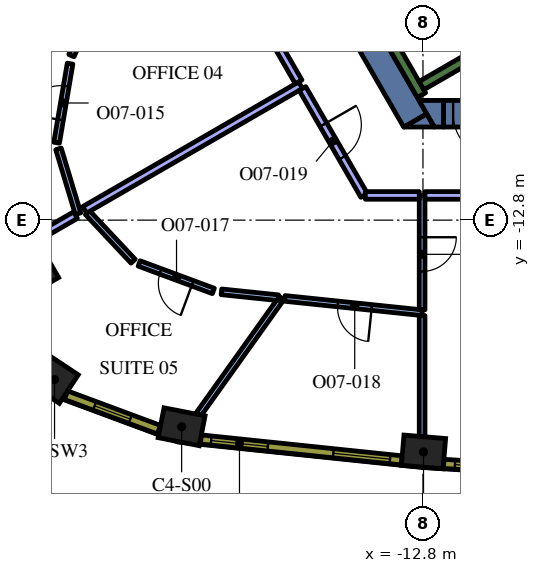
"""IFC4 building model, lengths in metres.
Left out: names, types, materials, properties, quantities, classifications, styles, units other than length and angle.
Written with IfcOpenShell. Run it as: python <this file> out.ifc"""

import sys

from ifc_helpers import new_model, si_unit, direction, frame, frame_2d, origin, origin_2d, place, context, subcontext, project, spatial, polyline, rectangle, outline, extrude, element, fill, save


model = new_model("IFC4")
c1 = context("Model", 3, precision=1e-05, world=origin(), true_north=direction((0.0, 1.0)))
c2 = subcontext(c1, "Body", "Model", "MODEL_VIEW")
j1 = project(units=[si_unit("LENGTHUNIT", "METRE"), si_unit("PLANEANGLEUNIT", "RADIAN")], contexts=[c1])
p1 = place(None, origin())
s1 = spatial("IfcSite", under=j1, at=p1, CompositionType="ELEMENT")
p2 = place(p1, origin())
s2 = spatial("IfcBuilding", under=s1, at=p2, CompositionType="ELEMENT")
p3 = place(p2, frame((0.0, 0.0, 214.2)))
s3 = spatial("IfcBuildingStorey", under=s2, at=p3, CompositionType="ELEMENT", Elevation=214.2)
p4 = place(p3, frame((-24.027, -13.872, 0.0), z_axis=(0.0, 0.0, 1.0), x_axis=(-0.866025403784, -0.5, 0.0)))
e1 = element("IfcColumn", 1, at=p4, inside=s3, PredefinedType="COLUMN", context=c2, shape_type="SweptSolid", body=[
    extrude(rectangle(XDim=2.4, YDim=2.4, at=origin_2d()), origin(), (0.0, 0.0, 1.0), 4.2),
])
for number, where, z_axis, x_axis in (
    (2, (-19.15, -18.237, 0.0), (0.0, 0.0, 1.0), (0.981, -0.192, 0.0)),
    (3, (-12.785, -18.9, 0.0), (0.0, 0.0, 1.0), (0.997, -0.083, 0.0)),
):
    element("IfcColumn", number, at=place(p3, frame(where, z_axis=z_axis, x_axis=x_axis)), inside=s3, PredefinedType="COLUMN", context=c2, shape_type="SweptSolid", body=[
        extrude(rectangle(XDim=1.1, YDim=0.8, at=origin_2d()), origin(), (0.0, 0.0, 1.0), 4.2),
    ])
p5 = place(p3, frame((-22.494, -16.997, 0.0), z_axis=(0.0, 0.0, 1.0), x_axis=(0.833238868178, -0.552913183563, 0.0)))
e4 = element("IfcColumn", 4, at=p5, inside=s3, PredefinedType="COLUMN", context=c2, shape_type="SweptSolid", body=[
    extrude(rectangle(XDim=0.9, YDim=0.9, at=origin_2d()), origin(), (0.0, 0.0, 1.0), 4.2),
])
p6 = place(p3, frame((-14.917, -6.863, 0.0), z_axis=(0.0, 0.0, 1.0), x_axis=(0.499972675833, -0.866041178825, 0.0)))
e5 = element("IfcWall", 5, at=p6, inside=s3, PredefinedType="SOLIDWALL", context=c2, shape_type="SweptSolid", body=[
    extrude(rectangle(XDim=3.829, YDim=0.7, at=frame_2d((1.915, 0.0))), origin(), (0.0, 0.0, 1.0), 4.2),
])
p7 = place(p3, origin())
e6 = element("IfcWall", 6, at=p7, inside=s3, PredefinedType="SOLIDWALL", context=c2, shape_type="SweptSolid", body=[
    extrude(outline(polyline([(-12.5, -10.35), (-13.296, -10.35), (-12.698, -10.005), (-12.5, -10.35)])), origin(), (0.0, 0.0, 1.0), 4.2),
])
e7 = element("IfcWall", 7, at=p7, inside=s3, PredefinedType="SOLIDWALL", context=c2, shape_type="SweptSolid", body=[
    extrude(outline(polyline([(-12.257, -10.35), (-12.5, -10.35), (-12.904, -9.65), (-12.257, -9.65), (-12.257, -10.35)])), origin(), (0.0, 0.0, 1.0), 4.2),
])
p8 = place(p3, frame((-12.84, -9.511, 0.0), z_axis=(0.0, 0.0, 1.0), x_axis=(-0.500048121057, 0.865997619297, 0.0)))
e8 = element("IfcWall", 8, at=p8, inside=s3, PredefinedType="SOLIDWALL", context=c2, shape_type="SweptSolid", body=[
    extrude(rectangle(XDim=3.634, YDim=0.25, at=frame_2d((1.817, 0.0))), origin(), (0.0, 0.0, 1.0), 4.2),
])
p9 = place(p3, frame((-12.84, -9.261, 0.0), z_axis=(0.0, 0.0, 1.0), x_axis=(0.866016039709, 0.500016218704, 0.0)))
e9 = element("IfcWall", 9, at=p9, inside=s3, PredefinedType="SOLIDWALL", context=c2, shape_type="SweptSolid", body=[
    extrude(rectangle(XDim=7.05, YDim=0.25, at=frame_2d((3.525, 0.0))), origin(), (0.0, 0.0, 1.0), 4.2),
])
p10 = place(p3, frame((-10.556, -10.0, 0.0), z_axis=(0.0, 0.0, 1.0), x_axis=(-1.0, 0.0, 0.0)))
e10 = element("IfcWall", 10, at=p10, inside=s3, PredefinedType="SOLIDWALL", context=c2, shape_type="SweptSolid", body=[
    extrude(rectangle(XDim=1.7, YDim=0.7, at=frame_2d((0.85, 0.0))), origin(), (0.0, 0.0, 1.0), 4.2),
])
p11 = place(p10, frame((0.25, 0.0, 0.0)))
e11 = element("IfcOpeningElement", 11, at=p11, cuts=e10, PredefinedType="OPENING", context=c2, shape_type="SweptSolid", body=[
    extrude(rectangle(XDim=1.2, YDim=2.1, at=frame_2d((0.6, 1.05))), frame((0.0, 0.36, 0.0), z_axis=(0.0, -1.0, 0.0), x_axis=(1.0, 0.0, 0.0)), (0.0, 0.0, 1.0), 0.72),
])
p12 = place(p3, frame((-21.386, -6.983, 0.0), z_axis=(0.0, 0.0, 1.0), x_axis=(-0.407597309494, -0.91316177827, 0.0)))
e12 = element("IfcWall", 12, at=p12, inside=s3, PredefinedType="PARTITIONING", context=c2, shape_type="SweptSolid", body=[
    extrude(rectangle(XDim=1.63, YDim=0.15, at=frame_2d((0.815, 0.0))), origin(), (0.0, 0.0, 1.0), 3.45),
])
p13 = place(p3, frame((-22.44, -10.763, 0.0), z_axis=(0.0, 0.0, 1.0), x_axis=(0.167682096872, 0.985841120257, 0.0)))
e13 = element("IfcWall", 13, at=p13, inside=s3, PredefinedType="PARTITIONING", context=c2, shape_type="SweptSolid", body=[
    extrude(rectangle(XDim=2.11, YDim=0.15, at=frame_2d((1.055, 0.0))), origin(), (0.0, 0.0, 1.0), 3.45),
])
p14 = place(p13, frame((0.61, 0.0, 0.0)))
e14 = element("IfcOpeningElement", 14, at=p14, cuts=e13, PredefinedType="OPENING", context=c2, shape_type="SweptSolid", body=[
    extrude(rectangle(XDim=0.9, YDim=2.1, at=frame_2d((0.45, 1.05))), frame((0.0, 0.085, 0.0), z_axis=(0.0, -1.0, 0.0), x_axis=(1.0, 0.0, 0.0)), (0.0, 0.0, 1.0), 0.17),
])
p15 = place(p3, frame((-22.391, -10.924, 0.0), z_axis=(0.0, 0.0, 1.0), x_axis=(0.288642134652, -0.957437056993, 0.0)))
e15 = element("IfcWall", 15, at=p15, inside=s3, PredefinedType="PARTITIONING", context=c2, shape_type="SweptSolid", body=[
    extrude(rectangle(XDim=1.782, YDim=0.15, at=frame_2d((0.891, 0.0))), origin(), (0.0, 0.0, 1.0), 3.45),
])
p16 = place(p3, frame((-21.943, -12.669, 0.0), z_axis=(0.0, 0.0, 1.0), x_axis=(-0.866030586491, -0.499991023182, 0.0)))
e16 = element("IfcWall", 16, at=p16, inside=s3, PredefinedType="PARTITIONING", context=c2, shape_type="SweptSolid", body=[
    extrude(rectangle(XDim=1.207, YDim=0.2, at=frame_2d((0.603, 0.0))), origin(), (0.0, 0.0, 1.0), 3.45),
])
p17 = place(p3, frame((-16.021, -9.25, 0.0), z_axis=(0.0, 0.0, 1.0), x_axis=(-0.866021955858, -0.500005971936, 0.0)))
e17 = element("IfcWall", 17, at=p17, inside=s3, PredefinedType="PARTITIONING", context=c2, shape_type="SweptSolid", body=[
    extrude(rectangle(XDim=6.56, YDim=0.2, at=frame_2d((3.28, 0.0))), origin(), (0.0, 0.0, 1.0), 3.45),
])
p18 = place(p3, frame((-17.681, -6.376, 0.0), z_axis=(0.0, 0.0, 1.0), x_axis=(0.500022299258, -0.866012528919, 0.0)))
e18 = element("IfcWall", 18, at=p18, inside=s3, PredefinedType="PARTITIONING", context=c2, shape_type="SweptSolid", body=[
    extrude(rectangle(XDim=3.219, YDim=0.2, at=frame_2d((1.609, 0.0))), origin(), (0.0, 0.0, 1.0), 3.45),
])
p19 = place(p3, frame((-16.521, -14.851, 0.0), z_axis=(0.0, 0.0, 1.0), x_axis=(-0.58104805465, -0.813869251285, 0.0)))
e19 = element("IfcWall", 19, at=p19, inside=s3, PredefinedType="PARTITIONING", context=c2, shape_type="SweptSolid", body=[
    extrude(rectangle(XDim=3.766, YDim=0.15, at=frame_2d((1.883, 0.0))), origin(), (0.0, 0.0, 1.0), 3.45),
])
p20 = place(p3, frame((-21.628, -12.603, 0.0), z_axis=(0.0, 0.0, 1.0), x_axis=(0.684778496912, -0.728751267695, 0.0)))
e20 = element("IfcWall", 20, at=p20, inside=s3, PredefinedType="PARTITIONING", context=c2, shape_type="SweptSolid", body=[
    extrude(rectangle(XDim=1.754, YDim=0.15, at=frame_2d((0.877, 0.0))), origin(), (0.0, 0.0, 1.0), 3.45),
])
p21 = place(p3, frame((-18.316, -14.664, 0.0), z_axis=(0.0, 0.0, 1.0), x_axis=(-0.937594570401, 0.347730386297, 0.0)))
e21 = element("IfcWall", 21, at=p21, inside=s3, PredefinedType="PARTITIONING", context=c2, shape_type="SweptSolid", body=[
    extrude(rectangle(XDim=2.083, YDim=0.15, at=frame_2d((1.042, 0.0))), origin(), (0.0, 0.0, 1.0), 3.45),
])
p22 = place(p21, frame((0.583, 0.0, 0.0)))
e22 = element("IfcOpeningElement", 22, at=p22, cuts=e21, PredefinedType="OPENING", context=c2, shape_type="SweptSolid", body=[
    extrude(rectangle(XDim=0.9, YDim=2.1, at=frame_2d((0.45, 1.05))), frame((0.0, 0.085, 0.0), z_axis=(0.0, -1.0, 0.0), x_axis=(1.0, 0.0, 0.0)), (0.0, 0.0, 1.0), 0.17),
])
p23 = place(p3, frame((-18.103, -14.686, 0.0), z_axis=(0.0, 0.0, 1.0), x_axis=(0.994622241781, -0.103569281909, 0.0)))
e23 = element("IfcWall", 23, at=p23, inside=s3, PredefinedType="PARTITIONING", context=c2, shape_type="SweptSolid", body=[
    extrude(rectangle(XDim=1.504, YDim=0.15, at=frame_2d((0.752, 0.0))), origin(), (0.0, 0.0, 1.0), 3.45),
])
p24 = place(p3, frame((-12.823, -15.236, 0.0), z_axis=(0.0, 0.0, 1.0), x_axis=(-0.994621582944, 0.10357560882, 0.0)))
e24 = element("IfcWall", 24, at=p24, inside=s3, PredefinedType="PARTITIONING", context=c2, shape_type="SweptSolid", body=[
    extrude(rectangle(XDim=3.632, YDim=0.15, at=frame_2d((1.816, 0.0))), origin(), (0.0, 0.0, 1.0), 3.45),
])
p25 = place(p24, frame((1.332, 0.0, 0.0)))
e25 = element("IfcOpeningElement", 25, at=p25, cuts=e24, PredefinedType="OPENING", context=c2, shape_type="SweptSolid", body=[
    extrude(rectangle(XDim=0.9, YDim=2.1, at=frame_2d((0.45, 1.05))), frame((0.0, 0.085, 0.0), z_axis=(0.0, -1.0, 0.0), x_axis=(1.0, 0.0, 0.0)), (0.0, 0.0, 1.0), 0.17),
])
p26 = place(p3, frame((-12.823, -15.312, 0.0), z_axis=(0.0, 0.0, 1.0), x_axis=(0.0, -1.0, 0.0)))
e26 = element("IfcWall", 26, at=p26, inside=s3, PredefinedType="PARTITIONING", context=c2, shape_type="SweptSolid", body=[
    extrude(rectangle(XDim=3.184, YDim=0.15, at=frame_2d((1.592, 0.0))), origin(), (0.0, 0.0, 1.0), 3.45),
])
p27 = place(p3, frame((-12.823, -12.15, 0.0), z_axis=(0.0, 0.0, 1.0), x_axis=(0.0, -1.0, 0.0)))
e27 = element("IfcWall", 27, at=p27, inside=s3, PredefinedType="PARTITIONING", context=c2, shape_type="SweptSolid", body=[
    extrude(rectangle(XDim=3.011, YDim=0.15, at=frame_2d((1.505, 0.0))), origin(), (0.0, 0.0, 1.0), 3.45),
])
p28 = place(p27, frame((1.1, 0.0, 0.0)))
e28 = element("IfcOpeningElement", 28, at=p28, cuts=e27, PredefinedType="OPENING", context=c2, shape_type="SweptSolid", body=[
    extrude(rectangle(XDim=0.9, YDim=2.1, at=frame_2d((0.45, 1.05))), frame((0.0, 0.085, 0.0), z_axis=(0.0, -1.0, 0.0), x_axis=(1.0, 0.0, 0.0)), (0.0, 0.0, 1.0), 0.17),
])
p29 = place(p3, frame((-15.971, -9.337, 0.0), z_axis=(0.0, 0.0, 1.0), x_axis=(0.500010870188, -0.866019127788, 0.0)))
e29 = element("IfcWall", 29, at=p29, inside=s3, PredefinedType="PARTITIONING", context=c2, shape_type="SweptSolid", body=[
    extrude(rectangle(XDim=3.249, YDim=0.2, at=frame_2d((1.624, 0.0))), origin(), (0.0, 0.0, 1.0), 3.45),
])
p30 = place(p29, frame((1.1, 0.0, 0.0)))
e30 = element("IfcOpeningElement", 30, at=p30, cuts=e29, PredefinedType="OPENING", context=c2, shape_type="SweptSolid", body=[
    extrude(rectangle(XDim=1.0, YDim=2.1, at=frame_2d((0.5, 1.05))), frame((0.0, 0.11, 0.0), z_axis=(0.0, -1.0, 0.0), x_axis=(1.0, 0.0, 0.0)), (0.0, 0.0, 1.0), 0.22),
])
p31 = place(p3, frame((-14.317, -12.15, 0.0), z_axis=(0.0, 0.0, 1.0), x_axis=(1.0, 0.0, 0.0)))
e31 = element("IfcWall", 31, at=p31, inside=s3, PredefinedType="PARTITIONING", context=c2, shape_type="SweptSolid", body=[
    extrude(rectangle(XDim=1.419, YDim=0.2, at=frame_2d((0.71, 0.0))), origin(), (0.0, 0.0, 1.0), 3.45),
])
p32 = place(p3, frame((-12.748, -12.15, 0.0), z_axis=(0.0, 0.0, 1.0), x_axis=(1.0, 0.0, 0.0)))
e32 = element("IfcWall", 32, at=p32, inside=s3, PredefinedType="PARTITIONING", context=c2, shape_type="SweptSolid", body=[
    extrude(rectangle(XDim=8.718, YDim=0.2, at=frame_2d((4.359, 0.0))), origin(), (0.0, 0.0, 1.0), 3.45),
])
p33 = place(p3, frame((-18.644, -18.571, 0.0), z_axis=(0.0, 0.0, 1.0), x_axis=(0.994621961215, -0.103571976272, 0.0)))
e33 = element("IfcWall", 33, at=p33, inside=s3, PredefinedType="SOLIDWALL", context=c2, shape_type="SweptSolid", body=[
    extrude(rectangle(XDim=5.311, YDim=0.24, at=frame_2d((2.655, 0.0))), origin(), (0.0, 0.0, 1.0), 3.95),
])
p34 = place(p33, frame((0.271, 0.0, 0.9)))
e34 = element("IfcOpeningElement", 34, at=p34, cuts=e33, PredefinedType="OPENING", context=c2, shape_type="SweptSolid", body=[
    extrude(rectangle(XDim=1.5, YDim=2.55, at=frame_2d((0.75, 1.275))), frame((0.0, 0.13, 0.0), z_axis=(0.0, -1.0, 0.0), x_axis=(1.0, 0.0, 0.0)), (0.0, 0.0, 1.0), 0.26),
])
p35 = place(p33, frame((3.504, 0.0, 0.9)))
e35 = element("IfcOpeningElement", 35, at=p35, cuts=e33, PredefinedType="OPENING", context=c2, shape_type="SweptSolid", body=[
    extrude(rectangle(XDim=1.5, YDim=2.55, at=frame_2d((0.75, 1.275))), frame((0.0, 0.13, 0.0), z_axis=(0.0, -1.0, 0.0), x_axis=(1.0, 0.0, 0.0)), (0.0, 0.0, 1.0), 0.26),
])
p36 = place(p3, frame((-12.253, -19.213, 0.0), z_axis=(0.0, 0.0, 1.0), x_axis=(0.9980633213, -0.062206162685, 0.0)))
e36 = element("IfcWall", 36, at=p36, inside=s3, PredefinedType="SOLIDWALL", context=c2, shape_type="SweptSolid", body=[
    extrude(rectangle(XDim=5.298, YDim=0.24, at=frame_2d((2.649, 0.0))), origin(), (0.0, 0.0, 1.0), 3.95),
])
p37 = place(p36, frame((0.294, 0.0, 0.9)))
e37 = element("IfcOpeningElement", 37, at=p37, cuts=e36, PredefinedType="OPENING", context=c2, shape_type="SweptSolid", body=[
    extrude(rectangle(XDim=1.5, YDim=2.55, at=frame_2d((0.75, 1.275))), frame((0.0, 0.13, 0.0), z_axis=(0.0, -1.0, 0.0), x_axis=(1.0, 0.0, 0.0)), (0.0, 0.0, 1.0), 0.26),
])
p38 = place(p36, frame((3.504, 0.0, 0.9)))
e38 = element("IfcOpeningElement", 38, at=p38, cuts=e36, PredefinedType="OPENING", context=c2, shape_type="SweptSolid", body=[
    extrude(rectangle(XDim=1.5, YDim=2.55, at=frame_2d((0.75, 1.275))), frame((0.0, 0.13, 0.0), z_axis=(0.0, -1.0, 0.0), x_axis=(1.0, 0.0, 0.0)), (0.0, 0.0, 1.0), 0.26),
])
p39 = place(p3, frame((-22.194, -17.406, 0.0), z_axis=(0.0, 0.0, 1.0), x_axis=(0.937569171184, -0.347798863203, 0.0)))
e39 = element("IfcWall", 39, at=p39, inside=s3, PredefinedType="SOLIDWALL", context=c2, shape_type="SweptSolid", body=[
    extrude(rectangle(XDim=2.609, YDim=0.24, at=frame_2d((1.305, 0.0))), origin(), (0.0, 0.0, 1.0), 3.95),
])
p40 = place(p39, frame((0.805, 0.0, 0.9)))
e40 = element("IfcOpeningElement", 40, at=p40, cuts=e39, PredefinedType="OPENING", context=c2, shape_type="SweptSolid", body=[
    extrude(rectangle(XDim=1.0, YDim=2.55, at=frame_2d((0.5, 1.275))), frame((0.0, 0.13, 0.0), z_axis=(0.0, -1.0, 0.0), x_axis=(1.0, 0.0, 0.0)), (0.0, 0.0, 1.0), 0.26),
])
p41 = place(p11, origin())
e41 = element("IfcDoor", 41, at=p41, inside=s3, OperationType="SINGLE_SWING_LEFT", PredefinedType="DOOR", context=c2, shape_type="SweptSolid", body=[
    extrude(rectangle(XDim=1.2, YDim=2.1, at=frame_2d((0.6, 1.05))), frame((0.0, 0.025, 0.0), z_axis=(0.0, -1.0, 0.0), x_axis=(1.0, 0.0, 0.0)), (0.0, 0.0, 1.0), 0.05),
])
fill(e11, e41)
p42 = place(p14, origin())
e42 = element("IfcDoor", 42, at=p42, inside=s3, OperationType="SINGLE_SWING_RIGHT", PredefinedType="DOOR", context=c2, shape_type="SweptSolid", body=[
    extrude(rectangle(XDim=0.9, YDim=2.1, at=frame_2d((0.45, 1.05))), frame((0.0, 0.025, 0.0), z_axis=(0.0, -1.0, 0.0), x_axis=(1.0, 0.0, 0.0)), (0.0, 0.0, 1.0), 0.05),
])
fill(e14, e42)
p43 = place(p22, origin())
e43 = element("IfcDoor", 43, at=p43, inside=s3, OperationType="SINGLE_SWING_LEFT", PredefinedType="DOOR", context=c2, shape_type="SweptSolid", body=[
    extrude(rectangle(XDim=0.9, YDim=2.1, at=frame_2d((0.45, 1.05))), frame((0.0, 0.025, 0.0), z_axis=(0.0, -1.0, 0.0), x_axis=(1.0, 0.0, 0.0)), (0.0, 0.0, 1.0), 0.05),
])
fill(e22, e43)
p44 = place(p25, origin())
e44 = element("IfcDoor", 44, at=p44, inside=s3, OperationType="SINGLE_SWING_LEFT", PredefinedType="DOOR", context=c2, shape_type="SweptSolid", body=[
    extrude(rectangle(XDim=0.9, YDim=2.1, at=frame_2d((0.45, 1.05))), frame((0.0, 0.025, 0.0), z_axis=(0.0, -1.0, 0.0), x_axis=(1.0, 0.0, 0.0)), (0.0, 0.0, 1.0), 0.05),
])
fill(e25, e44)
p45 = place(p30, origin())
e45 = element("IfcDoor", 45, at=p45, inside=s3, OperationType="SINGLE_SWING_LEFT", PredefinedType="DOOR", context=c2, shape_type="SweptSolid", body=[
    extrude(rectangle(XDim=1.0, YDim=2.1, at=frame_2d((0.5, 1.05))), frame((0.0, 0.025, 0.0), z_axis=(0.0, -1.0, 0.0), x_axis=(1.0, 0.0, 0.0)), (0.0, 0.0, 1.0), 0.05),
])
fill(e30, e45)
p46 = place(p28, origin())
e46 = element("IfcDoor", 46, at=p46, inside=s3, OperationType="SINGLE_SWING_RIGHT", PredefinedType="DOOR", context=c2, shape_type="SweptSolid", body=[
    extrude(rectangle(XDim=0.9, YDim=2.1, at=frame_2d((0.45, 1.05))), frame((0.0, 0.025, 0.0), z_axis=(0.0, -1.0, 0.0), x_axis=(1.0, 0.0, 0.0)), (0.0, 0.0, 1.0), 0.05),
])
fill(e28, e46)
p47 = place(p34, origin())
e47 = element("IfcWindow", 47, at=p47, inside=s3, PartitioningType="SINGLE_PANEL", PredefinedType="WINDOW", context=c2, shape_type="SweptSolid", body=[
    extrude(rectangle(XDim=1.5, YDim=2.55, at=frame_2d((0.75, 1.275))), frame((0.0, 0.04, 0.0), z_axis=(0.0, -1.0, 0.0), x_axis=(1.0, 0.0, 0.0)), (0.0, 0.0, 1.0), 0.06),
])
fill(e34, e47)
p48 = place(p35, origin())
e48 = element("IfcWindow", 48, at=p48, inside=s3, PartitioningType="SINGLE_PANEL", PredefinedType="WINDOW", context=c2, shape_type="SweptSolid", body=[
    extrude(rectangle(XDim=1.5, YDim=2.55, at=frame_2d((0.75, 1.275))), frame((0.0, 0.04, 0.0), z_axis=(0.0, -1.0, 0.0), x_axis=(1.0, 0.0, 0.0)), (0.0, 0.0, 1.0), 0.06),
])
fill(e35, e48)
p49 = place(p37, origin())
e49 = element("IfcWindow", 49, at=p49, inside=s3, PartitioningType="SINGLE_PANEL", PredefinedType="WINDOW", context=c2, shape_type="SweptSolid", body=[
    extrude(rectangle(XDim=1.5, YDim=2.55, at=frame_2d((0.75, 1.275))), frame((0.0, 0.04, 0.0), z_axis=(0.0, -1.0, 0.0), x_axis=(1.0, 0.0, 0.0)), (0.0, 0.0, 1.0), 0.06),
])
fill(e37, e49)
p50 = place(p40, origin())
e50 = element("IfcWindow", 50, at=p50, inside=s3, PartitioningType="SINGLE_PANEL", PredefinedType="WINDOW", context=c2, shape_type="SweptSolid", body=[
    extrude(rectangle(XDim=1.0, YDim=2.55, at=frame_2d((0.5, 1.275))), frame((0.0, 0.04, 0.0), z_axis=(0.0, -1.0, 0.0), x_axis=(1.0, 0.0, 0.0)), (0.0, 0.0, 1.0), 0.06),
])
fill(e40, e50)
save(model, sys.argv[1])
